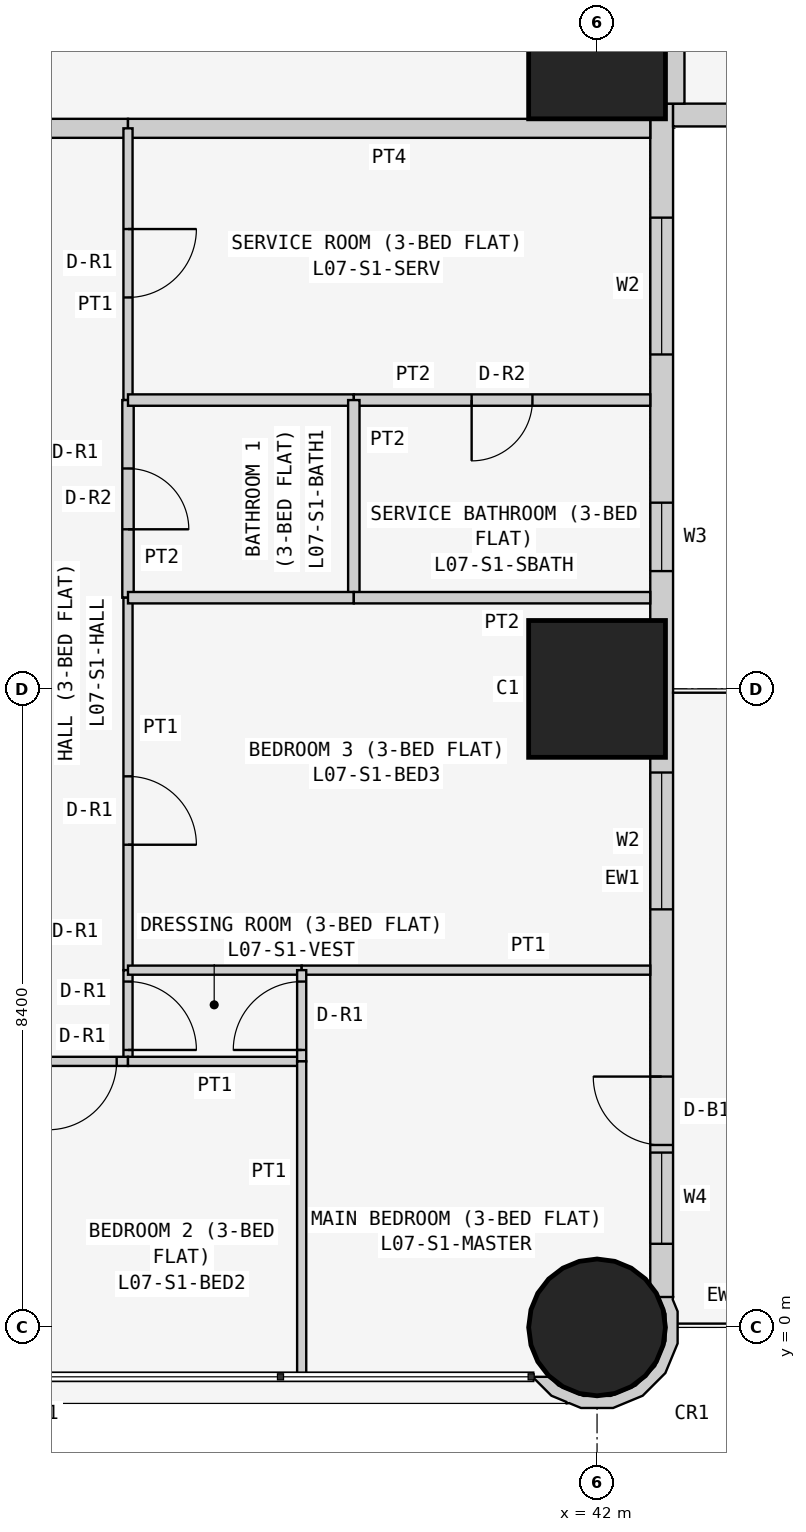
"""IFC4 building model, lengths in metres.
Left out: names, types, materials, properties, quantities, classifications, styles, units other than length and angle.
Written with IfcOpenShell. Run it as: python <this file> out.ifc"""

import sys

from ifc_helpers import new_model, si_unit, direction, frame, frame_2d, origin, origin_2d, place, context, subcontext, project, spatial, polyline, rectangle, circle, outline, extrude, element, fill, save


model = new_model("IFC4")
c1 = context("Model", 3, precision=1e-05, world=origin(), true_north=direction((0.0, 1.0)))
c2 = subcontext(c1, "Body", "Model", "MODEL_VIEW")
j1 = project(units=[si_unit("LENGTHUNIT", "METRE"), si_unit("PLANEANGLEUNIT", "RADIAN")], contexts=[c1])
p1 = place(None, origin())
s1 = spatial("IfcSite", under=j1, at=p1, CompositionType="ELEMENT")
p2 = place(p1, origin())
s2 = spatial("IfcBuilding", under=s1, at=p2, CompositionType="ELEMENT")
p3 = place(p2, frame((0.0, 0.0, 34.5)))
s3 = spatial("IfcBuildingStorey", under=s2, at=p3, CompositionType="ELEMENT", Elevation=34.5)
p4 = place(p3, frame((42.0, 0.0, 0.0), z_axis=(0.0, 0.0, 1.0), x_axis=(1.0, 0.0, 0.0)))
e1 = element("IfcColumn", 1, at=p4, inside=s3, PredefinedType="COLUMN", context=c2, shape_type="SweptSolid", body=[
    extrude(circle(Radius=0.9, at=origin_2d()), origin(), (0.0, 0.0, 1.0), 3.6),
])
for number, where, z_axis, x_axis in (
    (2, (42.0, 8.4, 0.0), (0.0, 0.0, 1.0), (1.0, 0.0, 0.0)),
    (3, (42.0, 16.8, 0.0), (0.0, 0.0, 1.0), (1.0, 0.0, 0.0)),
):
    element("IfcColumn", number, at=place(p3, frame(where, z_axis=z_axis, x_axis=x_axis)), inside=s3, PredefinedType="COLUMN", context=c2, shape_type="SweptSolid", body=[
        extrude(rectangle(XDim=1.8, YDim=1.8, at=origin_2d()), origin(), (0.0, 0.0, 1.0), 3.6),
    ])
p5 = place(p3, frame((42.85, 0.4, 0.0), z_axis=(0.0, 0.0, 1.0), x_axis=(0.0, 1.0, 0.0)))
e4 = element("IfcWall", 4, at=p5, inside=s3, PredefinedType="SOLIDWALL", context=c2, shape_type="SweptSolid", body=[
    extrude(rectangle(XDim=15.7, YDim=0.3, at=frame_2d((7.85, 0.0))), origin(), (0.0, 0.0, 1.0), 3.45),
])
p6 = place(p5, frame((12.4, 0.0, 0.9)))
e5 = element("IfcOpeningElement", 5, at=p6, cuts=e4, PredefinedType="OPENING", context=c2, shape_type="SweptSolid", body=[
    extrude(rectangle(XDim=1.8, YDim=1.5, at=frame_2d((0.9, 0.75))), frame((0.0, 0.16, 0.0), z_axis=(0.0, -1.0, 0.0), x_axis=(1.0, 0.0, 0.0)), (0.0, 0.0, 1.0), 0.32),
])
p7 = place(p5, frame((9.55, 0.0, 1.5)))
e6 = element("IfcOpeningElement", 6, at=p7, cuts=e4, PredefinedType="OPENING", context=c2, shape_type="SweptSolid", body=[
    extrude(rectangle(XDim=0.9, YDim=0.7, at=frame_2d((0.45, 0.35))), frame((0.0, 0.16, 0.0), z_axis=(0.0, -1.0, 0.0), x_axis=(1.0, 0.0, 0.0)), (0.0, 0.0, 1.0), 0.32),
])
p8 = place(p5, frame((5.1, 0.0, 0.9)))
e7 = element("IfcOpeningElement", 7, at=p8, cuts=e4, PredefinedType="OPENING", context=c2, shape_type="SweptSolid", body=[
    extrude(rectangle(XDim=1.8, YDim=1.5, at=frame_2d((0.9, 0.75))), frame((0.0, 0.16, 0.0), z_axis=(0.0, -1.0, 0.0), x_axis=(1.0, 0.0, 0.0)), (0.0, 0.0, 1.0), 0.32),
])
p9 = place(p5, frame((2.0, 0.0, 0.0)))
e8 = element("IfcOpeningElement", 8, at=p9, cuts=e4, PredefinedType="OPENING", context=c2, shape_type="SweptSolid", body=[
    extrude(rectangle(XDim=0.9, YDim=2.4, at=frame_2d((0.45, 1.2))), frame((0.0, 0.16, 0.0), z_axis=(0.0, -1.0, 0.0), x_axis=(1.0, 0.0, 0.0)), (0.0, 0.0, 1.0), 0.32),
])
p10 = place(p5, frame((0.7, 0.0, 0.9)))
e9 = element("IfcOpeningElement", 9, at=p10, cuts=e4, PredefinedType="OPENING", context=c2, shape_type="SweptSolid", body=[
    extrude(rectangle(XDim=1.2, YDim=1.5, at=frame_2d((0.6, 0.75))), frame((0.0, 0.16, 0.0), z_axis=(0.0, -1.0, 0.0), x_axis=(1.0, 0.0, 0.0)), (0.0, 0.0, 1.0), 0.32),
])
p11 = place(p3, frame((43.0, 15.95, 0.0), z_axis=(0.0, 0.0, 1.0), x_axis=(1.0, 0.0, 0.0)))
e10 = element("IfcWall", 10, at=p11, inside=s3, PredefinedType="SOLIDWALL", context=c2, shape_type="SweptSolid", body=[
    extrude(rectangle(XDim=15.4, YDim=0.3, at=frame_2d((7.7, 0.0))), origin(), (0.0, 0.0, 1.0), 3.45),
])
p12 = place(p11, frame((1.2, 0.0, 0.9)))
e11 = element("IfcOpeningElement", 11, at=p12, cuts=e10, PredefinedType="OPENING", context=c2, shape_type="SweptSolid", body=[
    extrude(rectangle(XDim=1.8, YDim=1.5, at=frame_2d((0.9, 0.75))), frame((0.0, 0.16, 0.0), z_axis=(0.0, -1.0, 0.0), x_axis=(1.0, 0.0, 0.0)), (0.0, 0.0, 1.0), 0.32),
])
p13 = place(p11, frame((4.95, 0.0, 1.5)))
e12 = element("IfcOpeningElement", 12, at=p13, cuts=e10, PredefinedType="OPENING", context=c2, shape_type="SweptSolid", body=[
    extrude(rectangle(XDim=0.9, YDim=0.7, at=frame_2d((0.45, 0.35))), frame((0.0, 0.16, 0.0), z_axis=(0.0, -1.0, 0.0), x_axis=(1.0, 0.0, 0.0)), (0.0, 0.0, 1.0), 0.32),
])
p14 = place(p11, frame((8.5, 0.0, 0.9)))
e13 = element("IfcOpeningElement", 13, at=p14, cuts=e10, PredefinedType="OPENING", context=c2, shape_type="SweptSolid", body=[
    extrude(rectangle(XDim=1.8, YDim=1.5, at=frame_2d((0.9, 0.75))), frame((0.0, 0.16, 0.0), z_axis=(0.0, -1.0, 0.0), x_axis=(1.0, 0.0, 0.0)), (0.0, 0.0, 1.0), 0.32),
])
p15 = place(p11, frame((12.5, 0.0, 0.0)))
e14 = element("IfcOpeningElement", 14, at=p15, cuts=e10, PredefinedType="OPENING", context=c2, shape_type="SweptSolid", body=[
    extrude(rectangle(XDim=0.9, YDim=2.4, at=frame_2d((0.45, 1.2))), frame((0.0, 0.16, 0.0), z_axis=(0.0, -1.0, 0.0), x_axis=(1.0, 0.0, 0.0)), (0.0, 0.0, 1.0), 0.32),
])
p16 = place(p11, frame((13.5, 0.0, 0.9)))
e15 = element("IfcOpeningElement", 15, at=p16, cuts=e10, PredefinedType="OPENING", context=c2, shape_type="SweptSolid", body=[
    extrude(rectangle(XDim=1.2, YDim=1.5, at=frame_2d((0.6, 0.75))), frame((0.0, 0.16, 0.0), z_axis=(0.0, -1.0, 0.0), x_axis=(1.0, 0.0, 0.0)), (0.0, 0.0, 1.0), 0.32),
])
p17 = place(p3, frame((41.233, -0.611, 0.0), z_axis=(0.0, 0.0, 1.0), x_axis=(0.377204953059, -0.926129809145, 0.0)))
e16 = element("IfcWall", 16, at=p17, inside=s3, PredefinedType="SOLIDWALL", context=c2, shape_type="SweptSolid", body=[
    extrude(outline(polyline([(0.319, 1.843), (-0.072, 2.001), (-0.24, 2.001), (-0.269, 2.017), (-0.37, 1.841), (-0.102, 1.842), (0.23, 1.707), (0.485, 1.455), (0.624, 1.125), (0.626, 0.766), (0.49, 0.434), (0.239, 0.179), (0.09, 0.117), (0.011, -0.078), (0.024, -0.083), (0.33, 0.045), (0.48, 0.197), (0.499, 0.193), (0.508, 0.225), (0.626, 0.345), (0.785, 0.736), (0.782, 1.157), (0.619, 1.546), (0.319, 1.843)])), origin(), (0.0, 0.0, 1.0), 3.45),
])
p18 = place(p3, frame((43.025, 22.971, 0.0), z_axis=(0.0, 0.0, 1.0), x_axis=(0.0, -1.0, 0.0)))
e17 = element("IfcWall", 17, at=p18, inside=s3, PredefinedType="PARTITIONING", context=c2, shape_type="SweptSolid", body=[
    extrude(rectangle(XDim=6.871, YDim=0.25, at=frame_2d((3.436, 0.0))), origin(), (0.0, 0.0, 1.0), 3.45),
])
p19 = place(p3, frame((35.829, 15.775, 0.0), z_axis=(0.0, 0.0, 1.0), x_axis=(-1.0, 0.0, 0.0)))
e18 = element("IfcWall", 18, at=p19, inside=s3, PredefinedType="PARTITIONING", context=c2, shape_type="SweptSolid", body=[
    extrude(rectangle(XDim=1.2, YDim=0.25, at=frame_2d((0.6, 0.0))), origin(), (0.0, 0.0, 1.0), 3.45),
])
p20 = place(p3, frame((42.7, 15.775, 0.0), z_axis=(0.0, 0.0, 1.0), x_axis=(-1.0, 0.0, 0.0)))
e19 = element("IfcWall", 19, at=p20, inside=s3, PredefinedType="PARTITIONING", context=c2, shape_type="SweptSolid", body=[
    extrude(rectangle(XDim=6.871, YDim=0.25, at=frame_2d((3.436, 0.0))), origin(), (0.0, 0.0, 1.0), 3.45),
])
p21 = place(p3, frame((35.829, 12.2, 0.0), z_axis=(0.0, 0.0, 1.0), x_axis=(0.0, 1.0, 0.0)))
e20 = element("IfcWall", 20, at=p21, inside=s3, PredefinedType="PARTITIONING", context=c2, shape_type="SweptSolid", body=[
    extrude(rectangle(XDim=3.575, YDim=0.12, at=frame_2d((1.788, 0.0))), origin(), (0.0, 0.0, 1.0), 3.45),
])
p22 = place(p21, frame((1.35, 0.0, 0.0)))
e21 = element("IfcOpeningElement", 21, at=p22, cuts=e20, PredefinedType="OPENING", context=c2, shape_type="SweptSolid", body=[
    extrude(rectangle(XDim=0.9, YDim=2.1, at=frame_2d((0.45, 1.05))), frame((0.0, 0.07, 0.0), z_axis=(0.0, -1.0, 0.0), x_axis=(1.0, 0.0, 0.0)), (0.0, 0.0, 1.0), 0.14),
])
p23 = place(p3, frame((35.829, 9.6, 0.0), z_axis=(0.0, 0.0, 1.0), x_axis=(0.0, 1.0, 0.0)))
e22 = element("IfcWall", 22, at=p23, inside=s3, PredefinedType="PARTITIONING", context=c2, shape_type="SweptSolid", body=[
    extrude(rectangle(XDim=2.6, YDim=0.15, at=frame_2d((1.3, 0.0))), origin(), (0.0, 0.0, 1.0), 3.45),
])
p24 = place(p23, frame((0.9, 0.0, 0.0)))
e23 = element("IfcOpeningElement", 23, at=p24, cuts=e22, PredefinedType="OPENING", context=c2, shape_type="SweptSolid", body=[
    extrude(rectangle(XDim=0.8, YDim=2.1, at=frame_2d((0.4, 1.05))), frame((0.0, 0.085, 0.0), z_axis=(0.0, -1.0, 0.0), x_axis=(1.0, 0.0, 0.0)), (0.0, 0.0, 1.0), 0.17),
])
p25 = place(p3, frame((35.829, 4.7, 0.0), z_axis=(0.0, 0.0, 1.0), x_axis=(0.0, 1.0, 0.0)))
e24 = element("IfcWall", 24, at=p25, inside=s3, PredefinedType="PARTITIONING", context=c2, shape_type="SweptSolid", body=[
    extrude(rectangle(XDim=4.9, YDim=0.12, at=frame_2d((2.45, 0.0))), origin(), (0.0, 0.0, 1.0), 3.45),
])
p26 = place(p25, frame((1.65, 0.0, 0.0)))
e25 = element("IfcOpeningElement", 25, at=p26, cuts=e24, PredefinedType="OPENING", context=c2, shape_type="SweptSolid", body=[
    extrude(rectangle(XDim=0.9, YDim=2.1, at=frame_2d((0.45, 1.05))), frame((0.0, 0.07, 0.0), z_axis=(0.0, -1.0, 0.0), x_axis=(1.0, 0.0, 0.0)), (0.0, 0.0, 1.0), 0.14),
])
p27 = place(p3, frame((35.829, 3.5, 0.0), z_axis=(0.0, 0.0, 1.0), x_axis=(0.0, 1.0, 0.0)))
e26 = element("IfcWall", 26, at=p27, inside=s3, PredefinedType="PARTITIONING", context=c2, shape_type="SweptSolid", body=[
    extrude(rectangle(XDim=1.2, YDim=0.12, at=frame_2d((0.6, 0.0))), origin(), (0.0, 0.0, 1.0), 3.45),
])
p28 = place(p27, frame((0.15, 0.0, 0.0)))
e27 = element("IfcOpeningElement", 27, at=p28, cuts=e26, PredefinedType="OPENING", context=c2, shape_type="SweptSolid", body=[
    extrude(rectangle(XDim=0.9, YDim=2.1, at=frame_2d((0.45, 1.05))), frame((0.0, 0.07, 0.0), z_axis=(0.0, -1.0, 0.0), x_axis=(1.0, 0.0, 0.0)), (0.0, 0.0, 1.0), 0.14),
])
p29 = place(p3, frame((34.629, 3.5, 0.0), z_axis=(0.0, 0.0, 1.0), x_axis=(1.0, 0.0, 0.0)))
e28 = element("IfcWall", 28, at=p29, inside=s3, PredefinedType="PARTITIONING", context=c2, shape_type="SweptSolid", body=[
    extrude(rectangle(XDim=1.2, YDim=0.12, at=frame_2d((0.6, 0.0))), origin(), (0.0, 0.0, 1.0), 3.45),
])
p30 = place(p29, frame((0.151, 0.0, 0.0)))
e29 = element("IfcOpeningElement", 29, at=p30, cuts=e28, PredefinedType="OPENING", context=c2, shape_type="SweptSolid", body=[
    extrude(rectangle(XDim=0.9, YDim=2.1, at=frame_2d((0.45, 1.05))), frame((0.0, 0.07, 0.0), z_axis=(0.0, -1.0, 0.0), x_axis=(1.0, 0.0, 0.0)), (0.0, 0.0, 1.0), 0.14),
])
p31 = place(p3, frame((35.829, 12.2, 0.0), z_axis=(0.0, 0.0, 1.0), x_axis=(1.0, 0.0, 0.0)))
e30 = element("IfcWall", 30, at=p31, inside=s3, PredefinedType="PARTITIONING", context=c2, shape_type="SweptSolid", body=[
    extrude(rectangle(XDim=2.971, YDim=0.15, at=frame_2d((1.485, 0.0))), origin(), (0.0, 0.0, 1.0), 3.45),
])
p32 = place(p3, frame((38.8, 12.2, 0.0), z_axis=(0.0, 0.0, 1.0), x_axis=(1.0, 0.0, 0.0)))
e31 = element("IfcWall", 31, at=p32, inside=s3, PredefinedType="PARTITIONING", context=c2, shape_type="SweptSolid", body=[
    extrude(rectangle(XDim=3.9, YDim=0.15, at=frame_2d((1.95, 0.0))), origin(), (0.0, 0.0, 1.0), 3.45),
])
p33 = place(p32, frame((1.55, 0.0, 0.0)))
e32 = element("IfcOpeningElement", 32, at=p33, cuts=e31, PredefinedType="OPENING", context=c2, shape_type="SweptSolid", body=[
    extrude(rectangle(XDim=0.8, YDim=2.1, at=frame_2d((0.4, 1.05))), frame((0.0, 0.085, 0.0), z_axis=(0.0, -1.0, 0.0), x_axis=(1.0, 0.0, 0.0)), (0.0, 0.0, 1.0), 0.17),
])
p34 = place(p3, frame((38.8, 9.6, 0.0), z_axis=(0.0, 0.0, 1.0), x_axis=(0.0, 1.0, 0.0)))
e33 = element("IfcWall", 33, at=p34, inside=s3, PredefinedType="PARTITIONING", context=c2, shape_type="SweptSolid", body=[
    extrude(rectangle(XDim=2.6, YDim=0.15, at=frame_2d((1.3, 0.0))), origin(), (0.0, 0.0, 1.0), 3.45),
])
p35 = place(p3, frame((35.829, 9.6, 0.0), z_axis=(0.0, 0.0, 1.0), x_axis=(1.0, 0.0, 0.0)))
e34 = element("IfcWall", 34, at=p35, inside=s3, PredefinedType="PARTITIONING", context=c2, shape_type="SweptSolid", body=[
    extrude(rectangle(XDim=2.971, YDim=0.15, at=frame_2d((1.485, 0.0))), origin(), (0.0, 0.0, 1.0), 3.45),
])
p36 = place(p3, frame((38.8, 9.6, 0.0), z_axis=(0.0, 0.0, 1.0), x_axis=(1.0, 0.0, 0.0)))
e35 = element("IfcWall", 35, at=p36, inside=s3, PredefinedType="PARTITIONING", context=c2, shape_type="SweptSolid", body=[
    extrude(rectangle(XDim=3.9, YDim=0.15, at=frame_2d((1.95, 0.0))), origin(), (0.0, 0.0, 1.0), 3.45),
])
p37 = place(p3, frame((35.829, 4.7, 0.0), z_axis=(0.0, 0.0, 1.0), x_axis=(1.0, 0.0, 0.0)))
e36 = element("IfcWall", 36, at=p37, inside=s3, PredefinedType="PARTITIONING", context=c2, shape_type="SweptSolid", body=[
    extrude(rectangle(XDim=2.285, YDim=0.12, at=frame_2d((1.143, 0.0))), origin(), (0.0, 0.0, 1.0), 3.45),
])
p38 = place(p3, frame((38.114, 4.7, 0.0), z_axis=(0.0, 0.0, 1.0), x_axis=(1.0, 0.0, 0.0)))
e37 = element("IfcWall", 37, at=p38, inside=s3, PredefinedType="PARTITIONING", context=c2, shape_type="SweptSolid", body=[
    extrude(rectangle(XDim=4.586, YDim=0.12, at=frame_2d((2.293, 0.0))), origin(), (0.0, 0.0, 1.0), 3.45),
])
p39 = place(p3, frame((35.829, 3.5, 0.0), z_axis=(0.0, 0.0, 1.0), x_axis=(1.0, 0.0, 0.0)))
e38 = element("IfcWall", 38, at=p39, inside=s3, PredefinedType="PARTITIONING", context=c2, shape_type="SweptSolid", body=[
    extrude(rectangle(XDim=2.285, YDim=0.12, at=frame_2d((1.143, 0.0))), origin(), (0.0, 0.0, 1.0), 3.45),
])
p40 = place(p3, frame((38.114, 3.5, 0.0), z_axis=(0.0, 0.0, 1.0), x_axis=(0.0, 1.0, 0.0)))
e39 = element("IfcWall", 39, at=p40, inside=s3, PredefinedType="PARTITIONING", context=c2, shape_type="SweptSolid", body=[
    extrude(rectangle(XDim=1.2, YDim=0.12, at=frame_2d((0.6, 0.0))), origin(), (0.0, 0.0, 1.0), 3.45),
])
p41 = place(p40, frame((0.15, 0.0, 0.0)))
e40 = element("IfcOpeningElement", 40, at=p41, cuts=e39, PredefinedType="OPENING", context=c2, shape_type="SweptSolid", body=[
    extrude(rectangle(XDim=0.9, YDim=2.1, at=frame_2d((0.45, 1.05))), frame((0.0, 0.07, 0.0), z_axis=(0.0, -1.0, 0.0), x_axis=(1.0, 0.0, 0.0)), (0.0, 0.0, 1.0), 0.14),
])
p42 = place(p3, frame((38.114, -0.65, 0.0), z_axis=(0.0, 0.0, 1.0), x_axis=(0.0, 1.0, 0.0)))
e41 = element("IfcWall", 41, at=p42, inside=s3, PredefinedType="PARTITIONING", context=c2, shape_type="SweptSolid", body=[
    extrude(rectangle(XDim=4.15, YDim=0.12, at=frame_2d((2.075, 0.0))), origin(), (0.0, 0.0, 1.0), 3.45),
])
p43 = place(p6, origin())
e42 = element("IfcWindow", 42, at=p43, inside=s3, PartitioningType="SINGLE_PANEL", PredefinedType="WINDOW", context=c2, shape_type="SweptSolid", body=[
    extrude(rectangle(XDim=1.8, YDim=1.5, at=frame_2d((0.9, 0.75))), frame((0.0, 0.03, 0.0), z_axis=(0.0, -1.0, 0.0), x_axis=(1.0, 0.0, 0.0)), (0.0, 0.0, 1.0), 0.06),
])
fill(e5, e42)
p44 = place(p7, origin())
e43 = element("IfcWindow", 43, at=p44, inside=s3, PartitioningType="SINGLE_PANEL", PredefinedType="WINDOW", context=c2, shape_type="SweptSolid", body=[
    extrude(rectangle(XDim=0.9, YDim=0.7, at=frame_2d((0.45, 0.35))), frame((0.0, 0.03, 0.0), z_axis=(0.0, -1.0, 0.0), x_axis=(1.0, 0.0, 0.0)), (0.0, 0.0, 1.0), 0.06),
])
fill(e6, e43)
p45 = place(p8, origin())
e44 = element("IfcWindow", 44, at=p45, inside=s3, PartitioningType="SINGLE_PANEL", PredefinedType="WINDOW", context=c2, shape_type="SweptSolid", body=[
    extrude(rectangle(XDim=1.8, YDim=1.5, at=frame_2d((0.9, 0.75))), frame((0.0, 0.03, 0.0), z_axis=(0.0, -1.0, 0.0), x_axis=(1.0, 0.0, 0.0)), (0.0, 0.0, 1.0), 0.06),
])
fill(e7, e44)
p46 = place(p9, origin())
e45 = element("IfcDoor", 45, at=p46, inside=s3, OperationType="SINGLE_SWING_RIGHT", PredefinedType="DOOR", context=c2, shape_type="SweptSolid", body=[
    extrude(rectangle(XDim=0.9, YDim=2.4, at=frame_2d((0.45, 1.2))), frame((0.0, 0.025, 0.0), z_axis=(0.0, -1.0, 0.0), x_axis=(1.0, 0.0, 0.0)), (0.0, 0.0, 1.0), 0.05),
])
fill(e8, e45)
p47 = place(p10, origin())
e46 = element("IfcWindow", 46, at=p47, inside=s3, PartitioningType="SINGLE_PANEL", PredefinedType="WINDOW", context=c2, shape_type="SweptSolid", body=[
    extrude(rectangle(XDim=1.2, YDim=1.5, at=frame_2d((0.6, 0.75))), frame((0.0, 0.03, 0.0), z_axis=(0.0, -1.0, 0.0), x_axis=(1.0, 0.0, 0.0)), (0.0, 0.0, 1.0), 0.06),
])
fill(e9, e46)
p48 = place(p22, frame((0.9, 0.0, 0.0), z_axis=(0.0, 0.0, 1.0), x_axis=(-1.0, 0.0, 0.0)))
e47 = element("IfcDoor", 47, at=p48, inside=s3, OperationType="SINGLE_SWING_LEFT", PredefinedType="DOOR", context=c2, shape_type="SweptSolid", body=[
    extrude(rectangle(XDim=0.9, YDim=2.1, at=frame_2d((0.45, 1.05))), frame((0.0, 0.025, 0.0), z_axis=(0.0, -1.0, 0.0), x_axis=(1.0, 0.0, 0.0)), (0.0, 0.0, 1.0), 0.05),
])
fill(e21, e47)
p49 = place(p33, frame((0.8, 0.0, 0.0), z_axis=(0.0, 0.0, 1.0), x_axis=(-1.0, 0.0, 0.0)))
e48 = element("IfcDoor", 48, at=p49, inside=s3, OperationType="SINGLE_SWING_RIGHT", PredefinedType="DOOR", context=c2, shape_type="SweptSolid", body=[
    extrude(rectangle(XDim=0.8, YDim=2.1, at=frame_2d((0.4, 1.05))), frame((0.0, 0.025, 0.0), z_axis=(0.0, -1.0, 0.0), x_axis=(1.0, 0.0, 0.0)), (0.0, 0.0, 1.0), 0.05),
])
fill(e32, e48)
p50 = place(p24, frame((0.8, 0.0, 0.0), z_axis=(0.0, 0.0, 1.0), x_axis=(-1.0, 0.0, 0.0)))
e49 = element("IfcDoor", 49, at=p50, inside=s3, OperationType="SINGLE_SWING_RIGHT", PredefinedType="DOOR", context=c2, shape_type="SweptSolid", body=[
    extrude(rectangle(XDim=0.8, YDim=2.1, at=frame_2d((0.4, 1.05))), frame((0.0, 0.025, 0.0), z_axis=(0.0, -1.0, 0.0), x_axis=(1.0, 0.0, 0.0)), (0.0, 0.0, 1.0), 0.05),
])
fill(e23, e49)
p51 = place(p26, frame((0.9, 0.0, 0.0), z_axis=(0.0, 0.0, 1.0), x_axis=(-1.0, 0.0, 0.0)))
e50 = element("IfcDoor", 50, at=p51, inside=s3, OperationType="SINGLE_SWING_RIGHT", PredefinedType="DOOR", context=c2, shape_type="SweptSolid", body=[
    extrude(rectangle(XDim=0.9, YDim=2.1, at=frame_2d((0.45, 1.05))), frame((0.0, 0.025, 0.0), z_axis=(0.0, -1.0, 0.0), x_axis=(1.0, 0.0, 0.0)), (0.0, 0.0, 1.0), 0.05),
])
fill(e25, e50)
p52 = place(p28, frame((0.9, 0.0, 0.0), z_axis=(0.0, 0.0, 1.0), x_axis=(-1.0, 0.0, 0.0)))
e51 = element("IfcDoor", 51, at=p52, inside=s3, OperationType="SINGLE_SWING_RIGHT", PredefinedType="DOOR", context=c2, shape_type="SweptSolid", body=[
    extrude(rectangle(XDim=0.9, YDim=2.1, at=frame_2d((0.45, 1.05))), frame((0.0, 0.025, 0.0), z_axis=(0.0, -1.0, 0.0), x_axis=(1.0, 0.0, 0.0)), (0.0, 0.0, 1.0), 0.05),
])
fill(e27, e51)
p53 = place(p41, origin())
e52 = element("IfcDoor", 52, at=p53, inside=s3, OperationType="SINGLE_SWING_LEFT", PredefinedType="DOOR", context=c2, shape_type="SweptSolid", body=[
    extrude(rectangle(XDim=0.9, YDim=2.1, at=frame_2d((0.45, 1.05))), frame((0.0, 0.025, 0.0), z_axis=(0.0, -1.0, 0.0), x_axis=(1.0, 0.0, 0.0)), (0.0, 0.0, 1.0), 0.05),
])
fill(e40, e52)
p54 = place(p30, frame((0.9, 0.0, 0.0), z_axis=(0.0, 0.0, 1.0), x_axis=(-1.0, 0.0, 0.0)))
e53 = element("IfcDoor", 53, at=p54, inside=s3, OperationType="SINGLE_SWING_RIGHT", PredefinedType="DOOR", context=c2, shape_type="SweptSolid", body=[
    extrude(rectangle(XDim=0.9, YDim=2.1, at=frame_2d((0.45, 1.05))), frame((0.0, 0.025, 0.0), z_axis=(0.0, -1.0, 0.0), x_axis=(1.0, 0.0, 0.0)), (0.0, 0.0, 1.0), 0.05),
])
fill(e29, e53)
save(model, sys.argv[1])
